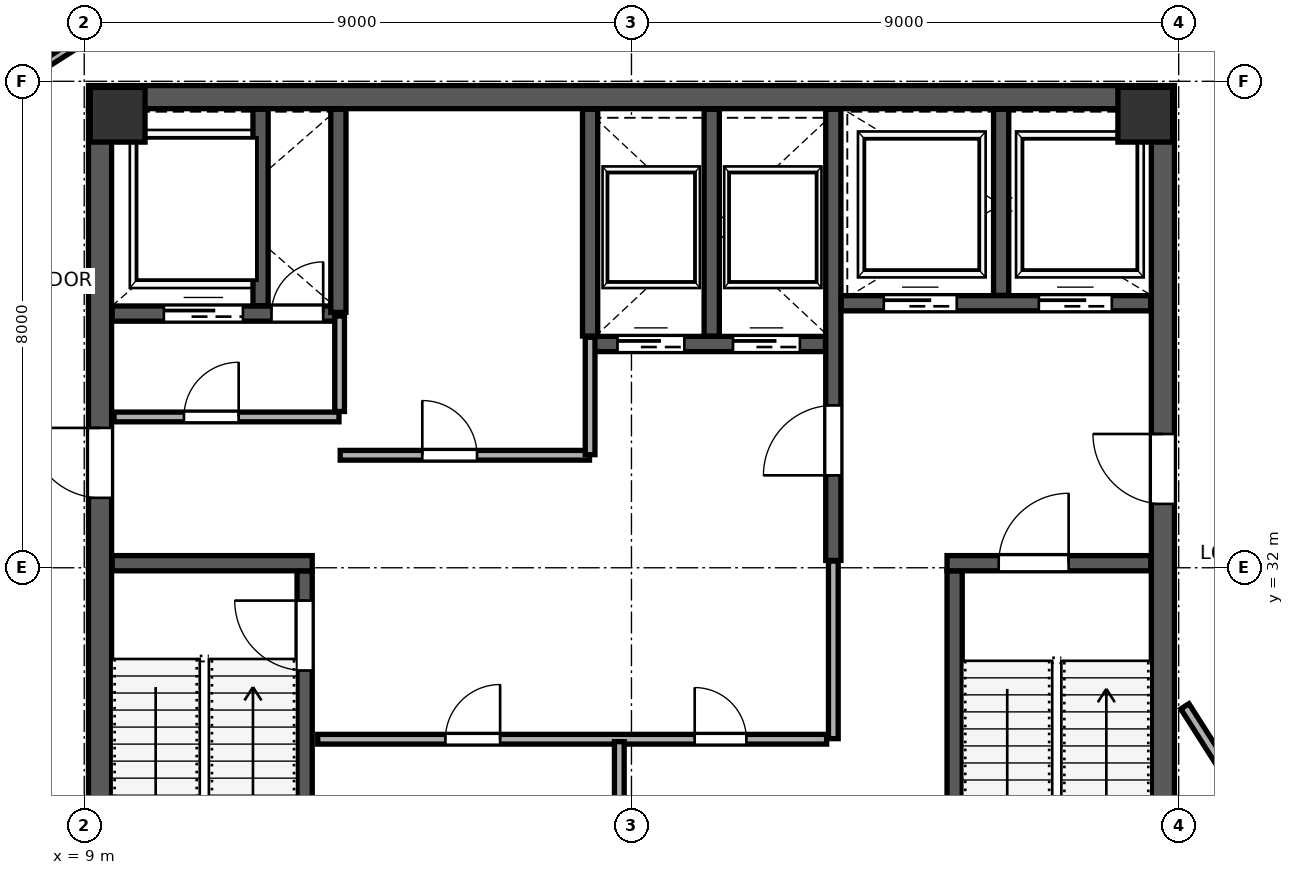
"""IFC4 building model, lengths in metres.
Left out: names, types, materials, properties, quantities, classifications, styles, units other than length and angle.
Written with IfcOpenShell. Run it as: python <this file> out.ifc"""

import sys

from ifc_helpers import new_model, si_unit, direction, frame, frame_2d, origin, origin_2d, place, context, subcontext, project, spatial, rectangle, extrude, source, transform, mapped, element, fill, save


model = new_model("IFC4")
c1 = context("Model", 3, precision=1e-05, world=origin(), true_north=direction((0.0, 1.0)))
c2 = subcontext(c1, "Body", "Model", "MODEL_VIEW")
j1 = project(units=[si_unit("LENGTHUNIT", "METRE"), si_unit("PLANEANGLEUNIT", "RADIAN")], contexts=[c1])
p1 = place(None, origin())
s1 = spatial("IfcSite", under=j1, at=p1, CompositionType="ELEMENT")
p2 = place(p1, origin())
s2 = spatial("IfcBuilding", under=s1, at=p2, CompositionType="ELEMENT")
p3 = place(p2, frame((0.0, 0.0, 307.2)))
s3 = spatial("IfcBuildingStorey", under=s2, at=p3, CompositionType="ELEMENT", Elevation=307.2)
m1 = source(origin(), c2, "Body", "SweptSolid", [
    extrude(rectangle(XDim=0.9, YDim=0.9, at=origin_2d()), origin(), (0.0, 0.0, 1.0), 4.198),
])
for number, where, z_axis, x_axis in (
    (1, (9.55, 39.45, 0.001), (0.0, 0.0, 1.0), (1.0, 0.0, 0.0)),
    (2, (26.45, 39.45, 0.001), (0.0, 0.0, 1.0), (1.0, 0.0, 0.0)),
):
    element("IfcColumn", number, at=place(p3, frame(where, z_axis=z_axis, x_axis=x_axis)), inside=s3, PredefinedType="COLUMN", context=c2, shape_type="MappedRepresentation", body=[
        mapped(m1, transform((0.0, 0.0, 0.0), scale=1.0)),
    ])
p4 = place(p3, frame((9.26, 24.45, 0.0), z_axis=(0.0, 0.0, 1.0), x_axis=(0.0, 1.0, 0.0)))
e3 = element("IfcWall", 3, at=p4, inside=s3, PredefinedType="SHEAR", context=c2, shape_type="SweptSolid", body=[
    extrude(rectangle(XDim=15.1, YDim=0.38, at=frame_2d((7.55, 0.0))), origin(), (0.0, 0.0, 1.0), 3.96),
])
p5 = place(p4, frame((8.7, 0.0, 0.0)))
e4 = element("IfcOpeningElement", 4, at=p5, cuts=e3, PredefinedType="OPENING", context=c2, shape_type="SweptSolid", body=[
    extrude(rectangle(XDim=1.15, YDim=2.2, at=frame_2d((0.575, 1.1))), frame((0.0, 0.2, 0.0), z_axis=(0.0, -1.0, 0.0), x_axis=(1.0, 0.0, 0.0)), (0.0, 0.0, 1.0), 0.4),
])
p6 = place(p3, frame((26.74, 24.45, 0.0), z_axis=(0.0, 0.0, 1.0), x_axis=(0.0, 1.0, 0.0)))
e5 = element("IfcWall", 5, at=p6, inside=s3, PredefinedType="SHEAR", context=c2, shape_type="SweptSolid", body=[
    extrude(rectangle(XDim=15.1, YDim=0.38, at=frame_2d((7.55, 0.0))), origin(), (0.0, 0.0, 1.0), 3.96),
])
p7 = place(p6, frame((8.6, 0.0, 0.0)))
e6 = element("IfcOpeningElement", 6, at=p7, cuts=e5, PredefinedType="OPENING", context=c2, shape_type="SweptSolid", body=[
    extrude(rectangle(XDim=1.15, YDim=2.2, at=frame_2d((0.575, 1.1))), frame((0.0, 0.2, 0.0), z_axis=(0.0, -1.0, 0.0), x_axis=(1.0, 0.0, 0.0)), (0.0, 0.0, 1.0), 0.4),
])
p8 = place(p3, frame((9.07, 39.74, 0.0), z_axis=(0.0, 0.0, 1.0), x_axis=(1.0, 0.0, 0.0)))
e7 = element("IfcWall", 7, at=p8, inside=s3, PredefinedType="SHEAR", context=c2, shape_type="SweptSolid", body=[
    extrude(rectangle(XDim=17.86, YDim=0.38, at=frame_2d((8.93, 0.0))), origin(), (0.0, 0.0, 1.0), 3.96),
])
p9 = place(p3, frame((12.625, 24.46, 0.0), z_axis=(0.0, 0.0, 1.0), x_axis=(0.0, 1.0, 0.0)))
e8 = element("IfcWall", 8, at=p9, inside=s3, PredefinedType="SHEAR", context=c2, shape_type="SweptSolid", body=[
    extrude(rectangle(XDim=7.49, YDim=0.25, at=frame_2d((3.745, 0.0))), origin(), (0.0, 0.0, 1.0), 3.96),
])
p10 = place(p9, frame((5.85, 0.0, 0.0)))
e9 = element("IfcOpeningElement", 9, at=p10, cuts=e8, PredefinedType="OPENING", context=c2, shape_type="SweptSolid", body=[
    extrude(rectangle(XDim=1.15, YDim=2.2, at=frame_2d((0.575, 1.1))), frame((0.0, 0.135, 0.0), z_axis=(0.0, -1.0, 0.0), x_axis=(1.0, 0.0, 0.0)), (0.0, 0.0, 1.0), 0.27),
])
p11 = place(p3, frame((9.46, 32.075, 0.0), z_axis=(0.0, 0.0, 1.0), x_axis=(1.0, 0.0, 0.0)))
e10 = element("IfcWall", 10, at=p11, inside=s3, PredefinedType="SHEAR", context=c2, shape_type="SweptSolid", body=[
    extrude(rectangle(XDim=3.29, YDim=0.25, at=frame_2d((1.645, 0.0))), origin(), (0.0, 0.0, 1.0), 3.96),
])
p12 = place(p3, frame((23.315, 24.46, 0.0), z_axis=(0.0, 0.0, 1.0), x_axis=(0.0, 1.0, 0.0)))
e11 = element("IfcWall", 11, at=p12, inside=s3, PredefinedType="SHEAR", context=c2, shape_type="SweptSolid", body=[
    extrude(rectangle(XDim=7.49, YDim=0.25, at=frame_2d((3.745, 0.0))), origin(), (0.0, 0.0, 1.0), 3.96),
])
p13 = place(p3, frame((23.19, 32.075, 0.0), z_axis=(0.0, 0.0, 1.0), x_axis=(1.0, 0.0, 0.0)))
e12 = element("IfcWall", 12, at=p13, inside=s3, PredefinedType="SHEAR", context=c2, shape_type="SweptSolid", body=[
    extrude(rectangle(XDim=3.35, YDim=0.25, at=frame_2d((1.675, 0.0))), origin(), (0.0, 0.0, 1.0), 3.96),
])
p14 = place(p13, frame((0.85, 0.0, 0.0)))
e13 = element("IfcOpeningElement", 13, at=p14, cuts=e12, PredefinedType="OPENING", context=c2, shape_type="SweptSolid", body=[
    extrude(rectangle(XDim=1.15, YDim=2.2, at=frame_2d((0.575, 1.1))), frame((0.0, 0.135, 0.0), z_axis=(0.0, -1.0, 0.0), x_axis=(1.0, 0.0, 0.0)), (0.0, 0.0, 1.0), 0.27),
])
p15 = place(p3, frame((21.32, 32.12, 0.0), z_axis=(0.0, 0.0, 1.0), x_axis=(0.0, 1.0, 0.0)))
e14 = element("IfcWall", 14, at=p15, inside=s3, PredefinedType="SHEAR", context=c2, shape_type="SweptSolid", body=[
    extrude(rectangle(XDim=7.42, YDim=0.25, at=frame_2d((3.71, 0.0))), origin(), (0.0, 0.0, 1.0), 3.96),
])
p16 = place(p15, frame((1.4, 0.0, 0.0)))
e15 = element("IfcOpeningElement", 15, at=p16, cuts=e14, PredefinedType="OPENING", context=c2, shape_type="SweptSolid", body=[
    extrude(rectangle(XDim=1.15, YDim=2.2, at=frame_2d((0.575, 1.1))), frame((0.0, 0.135, 0.0), z_axis=(0.0, -1.0, 0.0), x_axis=(1.0, 0.0, 0.0)), (0.0, 0.0, 1.0), 0.27),
])
p17 = place(p3, frame((9.46, 36.18, 0.0), z_axis=(0.0, 0.0, 1.0), x_axis=(1.0, 0.0, 0.0)))
e16 = element("IfcWall", 16, at=p17, inside=s3, PredefinedType="SHEAR", context=c2, shape_type="SweptSolid", body=[
    extrude(rectangle(XDim=3.79, YDim=0.25, at=frame_2d((1.895, 0.0))), origin(), (0.0, 0.0, 1.0), 3.96),
])
p18 = place(p17, frame((2.62, 0.0, 0.0)))
e17 = element("IfcOpeningElement", 17, at=p18, cuts=e16, PredefinedType="OPENING", context=c2, shape_type="SweptSolid", body=[
    extrude(rectangle(XDim=0.85, YDim=2.1, at=frame_2d((0.425, 1.05))), frame((0.0, 0.135, 0.0), z_axis=(0.0, -1.0, 0.0), x_axis=(1.0, 0.0, 0.0)), (0.0, 0.0, 1.0), 0.27),
])
p19 = place(p17, frame((0.85, 0.0, 0.0)))
e18 = element("IfcOpeningElement", 18, at=p19, cuts=e16, PredefinedType="OPENING", context=c2, shape_type="SweptSolid", body=[
    extrude(rectangle(XDim=1.3, YDim=2.25, at=frame_2d((0.65, 1.125))), frame((0.0, 0.135, 0.0), z_axis=(0.0, -1.0, 0.0), x_axis=(1.0, 0.0, 0.0)), (0.0, 0.0, 1.0), 0.27),
])
p20 = place(p3, frame((11.9, 36.31, 0.0), z_axis=(0.0, 0.0, 1.0), x_axis=(0.0, 1.0, 0.0)))
e19 = element("IfcWall", 19, at=p20, inside=s3, PredefinedType="SHEAR", context=c2, shape_type="SweptSolid", body=[
    extrude(rectangle(XDim=3.23, YDim=0.25, at=frame_2d((1.615, 0.0))), origin(), (0.0, 0.0, 1.0), 3.96),
])
p21 = place(p3, frame((21.45, 36.35, 0.0), z_axis=(0.0, 0.0, 1.0), x_axis=(1.0, 0.0, 0.0)))
e20 = element("IfcWall", 20, at=p21, inside=s3, PredefinedType="SHEAR", context=c2, shape_type="SweptSolid", body=[
    extrude(rectangle(XDim=5.09, YDim=0.25, at=frame_2d((2.545, 0.0))), origin(), (0.0, 0.0, 1.0), 3.96),
])
p22 = place(p21, frame((0.7, 0.0, 0.0)))
e21 = element("IfcOpeningElement", 21, at=p22, cuts=e20, PredefinedType="OPENING", context=c2, shape_type="SweptSolid", body=[
    extrude(rectangle(XDim=1.2, YDim=2.2, at=frame_2d((0.6, 1.1))), frame((0.0, 0.135, 0.0), z_axis=(0.0, -1.0, 0.0), x_axis=(1.0, 0.0, 0.0)), (0.0, 0.0, 1.0), 0.27),
])
p23 = place(p21, frame((3.25, 0.0, 0.0)))
e22 = element("IfcOpeningElement", 22, at=p23, cuts=e20, PredefinedType="OPENING", context=c2, shape_type="SweptSolid", body=[
    extrude(rectangle(XDim=1.2, YDim=2.2, at=frame_2d((0.6, 1.1))), frame((0.0, 0.135, 0.0), z_axis=(0.0, -1.0, 0.0), x_axis=(1.0, 0.0, 0.0)), (0.0, 0.0, 1.0), 0.27),
])
p24 = place(p3, frame((24.08, 36.48, 0.0), z_axis=(0.0, 0.0, 1.0), x_axis=(0.0, 1.0, 0.0)))
e23 = element("IfcWall", 23, at=p24, inside=s3, PredefinedType="SHEAR", context=c2, shape_type="SweptSolid", body=[
    extrude(rectangle(XDim=3.06, YDim=0.25, at=frame_2d((1.53, 0.0))), origin(), (0.0, 0.0, 1.0), 3.96),
])
p25 = place(p3, frame((13.18, 36.2, 0.0), z_axis=(0.0, 0.0, 1.0), x_axis=(0.0, 1.0, 0.0)))
e24 = element("IfcWall", 24, at=p25, inside=s3, PredefinedType="SHEAR", context=c2, shape_type="SweptSolid", body=[
    extrude(rectangle(XDim=3.34, YDim=0.25, at=frame_2d((1.67, 0.0))), origin(), (0.0, 0.0, 1.0), 3.96),
])
p26 = place(p3, frame((17.32, 35.68, 0.0), z_axis=(0.0, 0.0, 1.0), x_axis=(1.0, 0.0, 0.0)))
e25 = element("IfcWall", 25, at=p26, inside=s3, PredefinedType="SHEAR", context=c2, shape_type="SweptSolid", body=[
    extrude(rectangle(XDim=3.87, YDim=0.25, at=frame_2d((1.935, 0.0))), origin(), (0.0, 0.0, 1.0), 3.96),
])
p27 = place(p26, frame((0.45, 0.0, 0.0)))
e26 = element("IfcOpeningElement", 26, at=p27, cuts=e25, PredefinedType="OPENING", context=c2, shape_type="SweptSolid", body=[
    extrude(rectangle(XDim=1.1, YDim=2.2, at=frame_2d((0.55, 1.1))), frame((0.0, 0.135, 0.0), z_axis=(0.0, -1.0, 0.0), x_axis=(1.0, 0.0, 0.0)), (0.0, 0.0, 1.0), 0.27),
])
p28 = place(p26, frame((2.35, 0.0, 0.0)))
e27 = element("IfcOpeningElement", 27, at=p28, cuts=e25, PredefinedType="OPENING", context=c2, shape_type="SweptSolid", body=[
    extrude(rectangle(XDim=1.1, YDim=2.2, at=frame_2d((0.55, 1.1))), frame((0.0, 0.135, 0.0), z_axis=(0.0, -1.0, 0.0), x_axis=(1.0, 0.0, 0.0)), (0.0, 0.0, 1.0), 0.27),
])
for number, where, z_axis, x_axis in (
    (28, (17.32, 35.81, 0.0), (0.0, 0.0, 1.0), (0.0, 1.0, 0.0)),
    (29, (19.32, 35.81, 0.0), (0.0, 0.0, 1.0), (0.0, 1.0, 0.0)),
):
    element("IfcWall", number, at=place(p3, frame(where, z_axis=z_axis, x_axis=x_axis)), inside=s3, PredefinedType="SHEAR", context=c2, shape_type="SweptSolid", body=[
        extrude(rectangle(XDim=3.73, YDim=0.25, at=frame_2d((1.865, 0.0))), origin(), (0.0, 0.0, 1.0), 3.96),
    ])
p29 = place(p3, frame((9.49, 34.48, 0.0), z_axis=(0.0, 0.0, 1.0), x_axis=(1.0, 0.0, 0.0)))
e30 = element("IfcWall", 30, at=p29, inside=s3, PredefinedType="PARTITIONING", context=c2, shape_type="SweptSolid", body=[
    extrude(rectangle(XDim=3.7, YDim=0.16, at=frame_2d((1.85, 0.0))), origin(), (0.0, 0.0, 1.0), 3.96),
])
p30 = place(p29, frame((1.15, 0.0, 0.0)))
e31 = element("IfcOpeningElement", 31, at=p30, cuts=e30, PredefinedType="OPENING", context=c2, shape_type="SweptSolid", body=[
    extrude(rectangle(XDim=0.9, YDim=2.15, at=frame_2d((0.45, 1.075))), frame((0.0, 0.09, 0.0), z_axis=(0.0, -1.0, 0.0), x_axis=(1.0, 0.0, 0.0)), (0.0, 0.0, 1.0), 0.18),
])
p31 = place(p3, frame((13.2, 34.57, 0.0), z_axis=(0.0, 0.0, 1.0), x_axis=(0.0, 1.0, 0.0)))
e32 = element("IfcWall", 32, at=p31, inside=s3, PredefinedType="PARTITIONING", context=c2, shape_type="SweptSolid", body=[
    extrude(rectangle(XDim=1.57, YDim=0.16, at=frame_2d((0.785, 0.0))), origin(), (0.0, 0.0, 1.0), 3.96),
])
p32 = place(p3, frame((13.21, 33.85, 0.0), z_axis=(0.0, 0.0, 1.0), x_axis=(1.0, 0.0, 0.0)))
e33 = element("IfcWall", 33, at=p32, inside=s3, PredefinedType="PARTITIONING", context=c2, shape_type="SweptSolid", body=[
    extrude(rectangle(XDim=4.1, YDim=0.16, at=frame_2d((2.05, 0.0))), origin(), (0.0, 0.0, 1.0), 3.96),
])
p33 = place(p32, frame((1.35, 0.0, 0.0)))
e34 = element("IfcOpeningElement", 34, at=p33, cuts=e33, PredefinedType="OPENING", context=c2, shape_type="SweptSolid", body=[
    extrude(rectangle(XDim=0.9, YDim=2.15, at=frame_2d((0.45, 1.075))), frame((0.0, 0.09, 0.0), z_axis=(0.0, -1.0, 0.0), x_axis=(1.0, 0.0, 0.0)), (0.0, 0.0, 1.0), 0.18),
])
p34 = place(p3, frame((17.32, 33.86, 0.0), z_axis=(0.0, 0.0, 1.0), x_axis=(0.0, 1.0, 0.0)))
e35 = element("IfcWall", 35, at=p34, inside=s3, PredefinedType="PARTITIONING", context=c2, shape_type="SweptSolid", body=[
    extrude(rectangle(XDim=1.93, YDim=0.16, at=frame_2d((0.965, 0.0))), origin(), (0.0, 0.0, 1.0), 3.96),
])
p35 = place(p3, frame((12.84, 29.18, 0.0), z_axis=(0.0, 0.0, 1.0), x_axis=(1.0, 0.0, 0.0)))
e36 = element("IfcWall", 36, at=p35, inside=s3, PredefinedType="PARTITIONING", context=c2, shape_type="SweptSolid", body=[
    extrude(rectangle(XDim=8.37, YDim=0.16, at=frame_2d((4.185, 0.0))), origin(), (0.0, 0.0, 1.0), 3.96),
])
p36 = place(p35, frame((2.1, 0.0, 0.0)))
e37 = element("IfcOpeningElement", 37, at=p36, cuts=e36, PredefinedType="OPENING", context=c2, shape_type="SweptSolid", body=[
    extrude(rectangle(XDim=0.9, YDim=2.15, at=frame_2d((0.45, 1.075))), frame((0.0, 0.09, 0.0), z_axis=(0.0, -1.0, 0.0), x_axis=(1.0, 0.0, 0.0)), (0.0, 0.0, 1.0), 0.18),
])
p37 = place(p35, frame((6.2, 0.0, 0.0)))
e38 = element("IfcOpeningElement", 38, at=p37, cuts=e36, PredefinedType="OPENING", context=c2, shape_type="SweptSolid", body=[
    extrude(rectangle(XDim=0.85, YDim=2.1, at=frame_2d((0.425, 1.05))), frame((0.0, 0.09, 0.0), z_axis=(0.0, -1.0, 0.0), x_axis=(1.0, 0.0, 0.0)), (0.0, 0.0, 1.0), 0.18),
])
p38 = place(p3, frame((17.8, 24.54, 0.0), z_axis=(0.0, 0.0, 1.0), x_axis=(0.0, 1.0, 0.0)))
e39 = element("IfcWall", 39, at=p38, inside=s3, PredefinedType="PARTITIONING", context=c2, shape_type="SweptSolid", body=[
    extrude(rectangle(XDim=4.6, YDim=0.16, at=frame_2d((2.3, 0.0))), origin(), (0.0, 0.0, 1.0), 3.96),
])
p39 = place(p3, frame((21.32, 29.19, 0.0), z_axis=(0.0, 0.0, 1.0), x_axis=(0.0, 1.0, 0.0)))
e40 = element("IfcWall", 40, at=p39, inside=s3, PredefinedType="PARTITIONING", context=c2, shape_type="SweptSolid", body=[
    extrude(rectangle(XDim=2.92, YDim=0.16, at=frame_2d((1.46, 0.0))), origin(), (0.0, 0.0, 1.0), 3.96),
])
p40 = place(p3, frame((3.26, 30.945, 0.0), z_axis=(0.0, 0.0, 1.0), x_axis=(0.537307625317, -0.843386338386, 0.0)))
e41 = element("IfcWall", 41, at=p40, inside=s3, PredefinedType="PARTITIONING", context=c2, shape_type="SweptSolid", body=[
    extrude(rectangle(XDim=13.67, YDim=0.16, at=frame_2d((6.835, 0.0))), origin(), (0.0, 0.0, 1.0), 3.96),
])
p41 = place(p40, frame((1.15, 0.0, 0.0)))
e42 = element("IfcOpeningElement", 42, at=p41, cuts=e41, PredefinedType="OPENING", context=c2, shape_type="SweptSolid", body=[
    extrude(rectangle(XDim=0.95, YDim=2.15, at=frame_2d((0.475, 1.075))), frame((0.0, 0.09, 0.0), z_axis=(0.0, -1.0, 0.0), x_axis=(1.0, 0.0, 0.0)), (0.0, 0.0, 1.0), 0.18),
])
p42 = place(p3, frame((27.102, 29.721, 0.0), z_axis=(0.0, 0.0, 1.0), x_axis=(0.537279676557, -0.843404143432, 0.0)))
e43 = element("IfcWall", 43, at=p42, inside=s3, PredefinedType="PARTITIONING", context=c2, shape_type="SweptSolid", body=[
    extrude(rectangle(XDim=1.329, YDim=0.16, at=frame_2d((0.664, 0.0))), origin(), (0.0, 0.0, 1.0), 3.96),
])
p43 = place(p3, frame((22.509, 49.847, 0.0), z_axis=(0.0, 0.0, 1.0), x_axis=(0.537290700932, -0.843397120396, 0.0)))
e44 = element("IfcWall", 44, at=p43, inside=s3, PredefinedType="PARTITIONING", context=c2, shape_type="SweptSolid", body=[
    extrude(rectangle(XDim=20.77, YDim=0.135, at=frame_2d((10.385, 0.0))), origin(), (0.0, 0.0, 1.0), 3.96),
])
p44 = place(p43, frame((4.3, 0.0, 0.0)))
e45 = element("IfcOpeningElement", 45, at=p44, cuts=e44, PredefinedType="OPENING", context=c2, shape_type="SweptSolid", body=[
    extrude(rectangle(XDim=0.95, YDim=2.15, at=frame_2d((0.475, 1.075))), frame((0.0, 0.078, 0.0), z_axis=(0.0, -1.0, 0.0), x_axis=(1.0, 0.0, 0.0)), (0.0, 0.0, 1.0), 0.155),
])
p45 = place(p3, frame((1.798, 36.107, 0.0), z_axis=(0.0, 0.0, 1.0), x_axis=(0.843396745572, 0.537291289301, 0.0)))
e46 = element("IfcWall", 46, at=p45, inside=s3, PredefinedType="PARTITIONING", context=c2, shape_type="SweptSolid", body=[
    extrude(rectangle(XDim=17.17, YDim=0.135, at=frame_2d((8.585, 0.0))), origin(), (0.0, 0.0, 1.0), 3.96),
])
m2 = source(origin(), c2, "Body", "SweptSolid", [
    extrude(rectangle(XDim=1.15, YDim=2.2, at=frame_2d((0.575, 1.1))), frame((0.0, 0.025, 0.0), z_axis=(0.0, -1.0, 0.0), x_axis=(1.0, 0.0, 0.0)), (0.0, 0.0, 1.0), 0.05),
])
p46 = place(p10, origin())
e47 = element("IfcDoor", 47, at=p46, inside=s3, OperationType="SINGLE_SWING_RIGHT", PredefinedType="DOOR", context=c2, shape_type="MappedRepresentation", body=[
    mapped(m2, transform((0.0, 0.0, 0.0), scale=1.0)),
])
fill(e9, e47)
m3 = source(origin(), c2, "Body", "SweptSolid", [
    extrude(rectangle(XDim=1.15, YDim=2.2, at=frame_2d((0.575, 1.1))), frame((0.0, 0.025, 0.0), z_axis=(0.0, -1.0, 0.0), x_axis=(1.0, 0.0, 0.0)), (0.0, 0.0, 1.0), 0.05),
])
p47 = place(p16, origin())
e48 = element("IfcDoor", 48, at=p47, inside=s3, OperationType="SINGLE_SWING_LEFT", PredefinedType="DOOR", context=c2, shape_type="MappedRepresentation", body=[
    mapped(m3, transform((0.0, 0.0, 0.0), scale=1.0)),
])
fill(e15, e48)
p48 = place(p14, origin())
e49 = element("IfcDoor", 49, at=p48, inside=s3, OperationType="SINGLE_SWING_RIGHT", PredefinedType="DOOR", context=c2, shape_type="MappedRepresentation", body=[
    mapped(m2, transform((0.0, 0.0, 0.0), scale=1.0)),
])
fill(e13, e49)
p49 = place(p7, origin())
e50 = element("IfcDoor", 50, at=p49, inside=s3, OperationType="SINGLE_SWING_RIGHT", PredefinedType="DOOR", context=c2, shape_type="MappedRepresentation", body=[
    mapped(m3, transform((0.0, 0.0, 0.0), scale=1.0)),
])
fill(e6, e50)
p50 = place(p5, origin())
e51 = element("IfcDoor", 51, at=p50, inside=s3, OperationType="SINGLE_SWING_RIGHT", PredefinedType="DOOR", context=c2, shape_type="MappedRepresentation", body=[
    mapped(m3, transform((0.0, 0.0, 0.0), scale=1.0)),
])
fill(e4, e51)
m4 = source(origin(), c2, "Body", "SweptSolid", [
    extrude(rectangle(XDim=0.85, YDim=2.1, at=frame_2d((0.425, 1.05))), frame((0.0, 0.025, 0.0), z_axis=(0.0, -1.0, 0.0), x_axis=(1.0, 0.0, 0.0)), (0.0, 0.0, 1.0), 0.05),
])
p51 = place(p18, origin())
e52 = element("IfcDoor", 52, at=p51, inside=s3, OperationType="SINGLE_SWING_RIGHT", PredefinedType="DOOR", context=c2, shape_type="MappedRepresentation", body=[
    mapped(m4, transform((0.0, 0.0, 0.0), scale=1.0)),
])
fill(e17, e52)
m5 = source(origin(), c2, "Body", "SweptSolid", [
    extrude(rectangle(XDim=1.1, YDim=2.2, at=frame_2d((0.55, 1.1))), frame((0.0, 0.025, 0.0), z_axis=(0.0, -1.0, 0.0), x_axis=(1.0, 0.0, 0.0)), (0.0, 0.0, 1.0), 0.05),
])
p52 = place(p27, origin())
e53 = element("IfcDoor", 53, at=p52, inside=s3, OperationType="SLIDING_TO_LEFT", PredefinedType="DOOR", context=c2, shape_type="MappedRepresentation", body=[
    mapped(m5, transform((0.0, 0.0, 0.0), scale=1.0)),
])
fill(e26, e53)
p53 = place(p28, origin())
e54 = element("IfcDoor", 54, at=p53, inside=s3, OperationType="SLIDING_TO_RIGHT", PredefinedType="DOOR", context=c2, shape_type="MappedRepresentation", body=[
    mapped(m5, transform((0.0, 0.0, 0.0), scale=1.0)),
])
fill(e27, e54)
m6 = source(origin(), c2, "Body", "SweptSolid", [
    extrude(rectangle(XDim=1.2, YDim=2.2, at=frame_2d((0.6, 1.1))), frame((0.0, 0.025, 0.0), z_axis=(0.0, -1.0, 0.0), x_axis=(1.0, 0.0, 0.0)), (0.0, 0.0, 1.0), 0.05),
])
p54 = place(p22, origin())
e55 = element("IfcDoor", 55, at=p54, inside=s3, OperationType="SLIDING_TO_LEFT", PredefinedType="DOOR", context=c2, shape_type="MappedRepresentation", body=[
    mapped(m6, transform((0.0, 0.0, 0.0), scale=1.0)),
])
fill(e21, e55)
p55 = place(p23, origin())
e56 = element("IfcDoor", 56, at=p55, inside=s3, OperationType="SLIDING_TO_RIGHT", PredefinedType="DOOR", context=c2, shape_type="MappedRepresentation", body=[
    mapped(m6, transform((0.0, 0.0, 0.0), scale=1.0)),
])
fill(e22, e56)
m7 = source(origin(), c2, "Body", "SweptSolid", [
    extrude(rectangle(XDim=1.3, YDim=2.25, at=frame_2d((0.65, 1.125))), frame((0.0, 0.025, 0.0), z_axis=(0.0, -1.0, 0.0), x_axis=(1.0, 0.0, 0.0)), (0.0, 0.0, 1.0), 0.05),
])
p56 = place(p19, origin())
e57 = element("IfcDoor", 57, at=p56, inside=s3, OperationType="SLIDING_TO_LEFT", PredefinedType="DOOR", context=c2, shape_type="MappedRepresentation", body=[
    mapped(m7, transform((0.0, 0.0, 0.0), scale=1.0)),
])
fill(e18, e57)
m8 = source(origin(), c2, "Body", "SweptSolid", [
    extrude(rectangle(XDim=0.9, YDim=2.15, at=frame_2d((0.45, 1.075))), frame((0.0, 0.025, 0.0), z_axis=(0.0, -1.0, 0.0), x_axis=(1.0, 0.0, 0.0)), (0.0, 0.0, 1.0), 0.05),
])
p57 = place(p30, origin())
e58 = element("IfcDoor", 58, at=p57, inside=s3, OperationType="SINGLE_SWING_RIGHT", PredefinedType="DOOR", context=c2, shape_type="MappedRepresentation", body=[
    mapped(m8, transform((0.0, 0.0, 0.0), scale=1.0)),
])
fill(e31, e58)
p58 = place(p33, origin())
e59 = element("IfcDoor", 59, at=p58, inside=s3, OperationType="SINGLE_SWING_LEFT", PredefinedType="DOOR", context=c2, shape_type="MappedRepresentation", body=[
    mapped(m8, transform((0.0, 0.0, 0.0), scale=1.0)),
])
fill(e34, e59)
p59 = place(p36, origin())
e60 = element("IfcDoor", 60, at=p59, inside=s3, OperationType="SINGLE_SWING_RIGHT", PredefinedType="DOOR", context=c2, shape_type="MappedRepresentation", body=[
    mapped(m8, transform((0.0, 0.0, 0.0), scale=1.0)),
])
fill(e37, e60)
p60 = place(p37, origin())
e61 = element("IfcDoor", 61, at=p60, inside=s3, OperationType="SINGLE_SWING_LEFT", PredefinedType="DOOR", context=c2, shape_type="MappedRepresentation", body=[
    mapped(m4, transform((0.0, 0.0, 0.0), scale=1.0)),
])
fill(e38, e61)
save(model, sys.argv[1])
